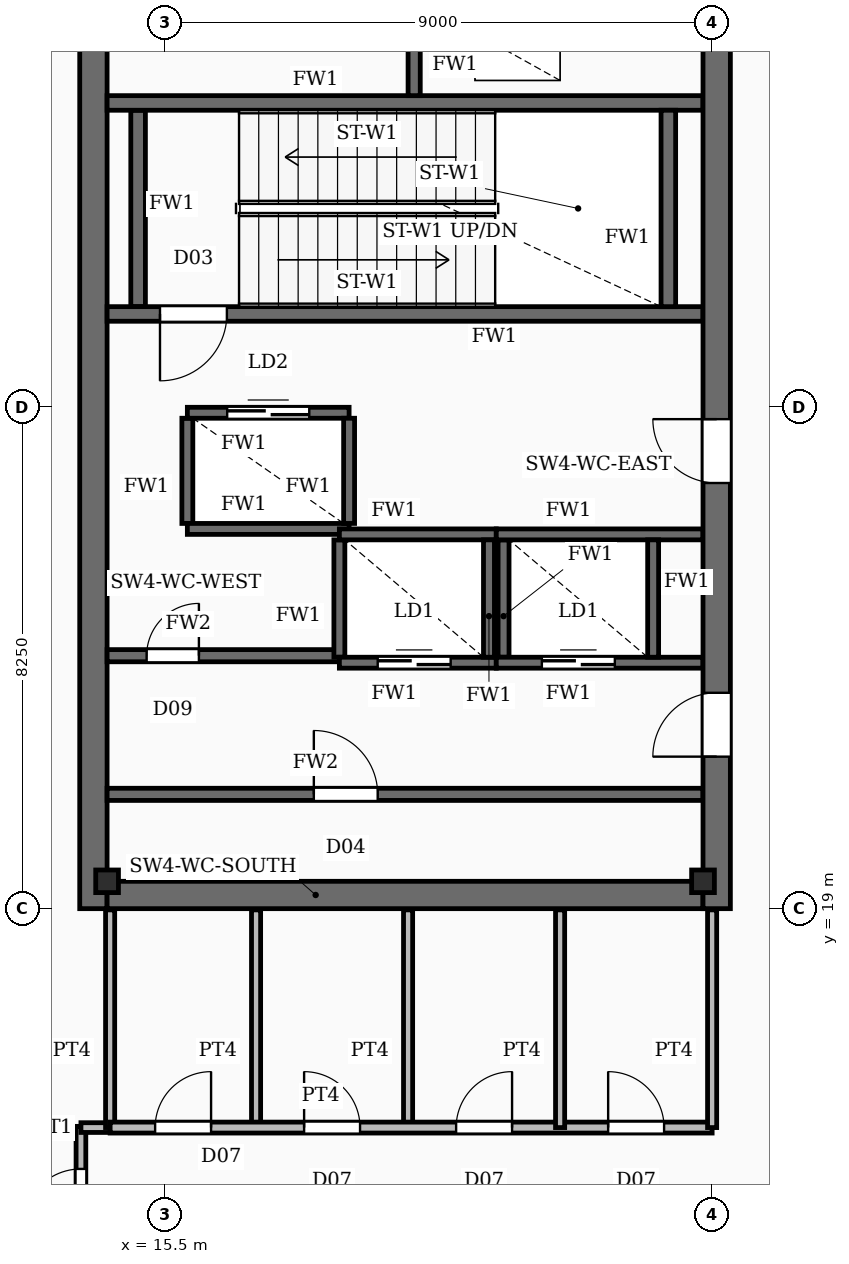
"""IFC4 building model, lengths in metres.
Left out: names, types, materials, properties, quantities, classifications, styles, units other than length and angle.
Written with IfcOpenShell. Run it as: python <this file> out.ifc"""

import sys

from ifc_helpers import new_model, si_unit, direction, frame, frame_2d, origin, origin_2d, place, context, subcontext, project, spatial, rectangle, i_section, extrude, element, fill, save


model = new_model("IFC4")
c1 = context("Model", 3, precision=1e-05, world=origin(), true_north=direction((0.0, 1.0)))
c2 = subcontext(c1, "Body", "Model", "MODEL_VIEW")
j1 = project(units=[si_unit("LENGTHUNIT", "METRE"), si_unit("PLANEANGLEUNIT", "RADIAN")], contexts=[c1])
p1 = place(None, origin())
s1 = spatial("IfcSite", under=j1, at=p1, CompositionType="ELEMENT")
p2 = place(p1, origin())
s2 = spatial("IfcBuilding", under=s1, at=p2, CompositionType="ELEMENT")
p3 = place(p2, frame((0.0, 0.0, 317.2)))
s3 = spatial("IfcBuildingStorey", under=s2, at=p3, CompositionType="ELEMENT", Elevation=317.2)
p4 = place(p3, frame((14.325, 19.0, -0.24), z_axis=(0.0, 0.0, 1.0), x_axis=(0.0, 1.0, 0.0)))
e1 = element("IfcWall", 1, at=p4, inside=s3, PredefinedType="SHEAR", context=c2, shape_type="SweptSolid", body=[
    extrude(rectangle(XDim=15.3, YDim=0.45, at=frame_2d((7.65, 0.0))), origin(), (0.0, 0.0, 1.0), 4.62),
])
p5 = place(p3, frame((24.575, 19.0, -0.24), z_axis=(0.0, 0.0, 1.0), x_axis=(0.0, 1.0, 0.0)))
e2 = element("IfcWall", 2, at=p5, inside=s3, PredefinedType="SHEAR", context=c2, shape_type="SweptSolid", body=[
    extrude(rectangle(XDim=15.3, YDim=0.45, at=frame_2d((7.65, 0.0))), origin(), (0.0, 0.0, 1.0), 4.62),
])
p6 = place(p5, frame((2.5, 0.0, 0.24)))
e3 = element("IfcOpeningElement", 3, at=p6, cuts=e2, PredefinedType="OPENING", context=c2, shape_type="SweptSolid", body=[
    extrude(rectangle(XDim=1.05, YDim=2.15, at=frame_2d((0.525, 1.075))), frame((0.0, 0.235, 0.0), z_axis=(0.0, -1.0, 0.0), x_axis=(1.0, 0.0, 0.0)), (0.0, 0.0, 1.0), 0.47),
])
p7 = place(p5, frame((7.0, 0.0, 0.24)))
e4 = element("IfcOpeningElement", 4, at=p7, cuts=e2, PredefinedType="OPENING", context=c2, shape_type="SweptSolid", body=[
    extrude(rectangle(XDim=1.05, YDim=2.15, at=frame_2d((0.525, 1.075))), frame((0.0, 0.235, 0.0), z_axis=(0.0, -1.0, 0.0), x_axis=(1.0, 0.0, 0.0)), (0.0, 0.0, 1.0), 0.47),
])
p8 = place(p3, frame((14.55, 19.225, -0.24), z_axis=(0.0, 0.0, 1.0), x_axis=(1.0, 0.0, 0.0)))
e5 = element("IfcWall", 5, at=p8, inside=s3, PredefinedType="SHEAR", context=c2, shape_type="SweptSolid", body=[
    extrude(rectangle(XDim=9.8, YDim=0.45, at=frame_2d((4.9, 0.0))), origin(), (0.0, 0.0, 1.0), 4.62),
])
for number, where, z_axis, x_axis in (
    (6, (14.55, 19.45, -0.24), (0.0, 0.0, 1.0), (1.0, 0.0, 0.0)),
    (7, (24.35, 19.45, -0.24), (0.0, 0.0, 1.0), (1.0, 0.0, 0.0)),
):
    element("IfcColumn", number, at=place(p3, frame(where, z_axis=z_axis, x_axis=x_axis)), inside=s3, PredefinedType="COLUMN", context=c2, shape_type="SweptSolid", body=[
        extrude(i_section(OverallWidth=0.374, OverallDepth=0.372, WebThickness=0.016, FlangeThickness=0.026, FilletRadius=0.02, at=origin_2d()), origin(), (0.0, 0.0, 1.0), 4.62),
    ])
p9 = place(p3, frame((24.35, 28.78, 0.0), z_axis=(0.0, 0.0, 1.0), x_axis=(-1.0, 0.0, 0.0)))
e8 = element("IfcWall", 8, at=p9, inside=s3, PredefinedType="SOLIDWALL", context=c2, shape_type="SweptSolid", body=[
    extrude(rectangle(XDim=9.8, YDim=0.24, at=frame_2d((4.9, 0.0))), origin(), (0.0, 0.0, 1.0), 4.38),
])
p10 = place(p9, frame((7.83, 0.0, 0.0)))
e9 = element("IfcOpeningElement", 9, at=p10, cuts=e8, PredefinedType="OPENING", context=c2, shape_type="SweptSolid", body=[
    extrude(rectangle(XDim=1.1, YDim=2.15, at=frame_2d((0.55, 1.075))), frame((0.0, 0.13, 0.0), z_axis=(0.0, -1.0, 0.0), x_axis=(1.0, 0.0, 0.0)), (0.0, 0.0, 1.0), 0.26),
])
p11 = place(p3, frame((14.55, 32.25, 0.0), z_axis=(0.0, 0.0, 1.0), x_axis=(1.0, 0.0, 0.0)))
e10 = element("IfcWall", 10, at=p11, inside=s3, PredefinedType="SOLIDWALL", context=c2, shape_type="SweptSolid", body=[
    extrude(rectangle(XDim=9.8, YDim=0.24, at=frame_2d((4.9, 0.0))), origin(), (0.0, 0.0, 1.0), 4.38),
])
for number, where, z_axis, x_axis in (
    (11, (15.06, 28.9, 0.0), (0.0, 0.0, 1.0), (0.0, 1.0, 0.0)),
    (12, (23.78, 28.9, 0.0), (0.0, 0.0, 1.0), (0.0, 1.0, 0.0)),
):
    element("IfcWall", number, at=place(p3, frame(where, z_axis=z_axis, x_axis=x_axis)), inside=s3, PredefinedType="SOLIDWALL", context=c2, shape_type="SweptSolid", body=[
        extrude(rectangle(XDim=3.23, YDim=0.24, at=frame_2d((1.615, 0.0))), origin(), (0.0, 0.0, 1.0), 4.38),
    ])
p12 = place(p3, frame((19.6, 32.37, 0.0), z_axis=(0.0, 0.0, 1.0), x_axis=(0.0, 1.0, 0.0)))
e13 = element("IfcWall", 13, at=p12, inside=s3, PredefinedType="SOLIDWALL", context=c2, shape_type="SweptSolid", body=[
    extrude(rectangle(XDim=1.43, YDim=0.2, at=frame_2d((0.715, 0.0))), origin(), (0.0, 0.0, 1.0), 4.38),
])
p13 = place(p3, frame((18.37, 25.155, 0.0), z_axis=(0.0, 0.0, 1.0), x_axis=(1.0, 0.0, 0.0)))
e14 = element("IfcWall", 14, at=p13, inside=s3, PredefinedType="SOLIDWALL", context=c2, shape_type="SweptSolid", body=[
    extrude(rectangle(XDim=2.58, YDim=0.18, at=frame_2d((1.29, 0.0))), origin(), (0.0, 0.0, 1.0), 4.38),
])
p14 = place(p3, frame((18.37, 23.045, 0.0), z_axis=(0.0, 0.0, 1.0), x_axis=(1.0, 0.0, 0.0)))
e15 = element("IfcWall", 15, at=p14, inside=s3, PredefinedType="SOLIDWALL", context=c2, shape_type="SweptSolid", body=[
    extrude(rectangle(XDim=2.58, YDim=0.18, at=frame_2d((1.29, 0.0))), origin(), (0.0, 0.0, 1.0), 4.38),
])
p15 = place(p14, frame((0.63, 0.0, 0.0)))
e16 = element("IfcOpeningElement", 16, at=p15, cuts=e15, PredefinedType="OPENING", context=c2, shape_type="SweptSolid", body=[
    extrude(rectangle(XDim=1.2, YDim=2.2, at=frame_2d((0.6, 1.1))), frame((0.0, 0.1, 0.0), z_axis=(0.0, -1.0, 0.0), x_axis=(1.0, 0.0, 0.0)), (0.0, 0.0, 1.0), 0.2),
])
for number, where, z_axis, x_axis in (
    (17, (18.37, 23.135, 0.0), (0.0, 0.0, 1.0), (0.0, 1.0, 0.0)),
    (18, (20.83, 23.135, 0.0), (0.0, 0.0, 1.0), (0.0, 1.0, 0.0)),
):
    element("IfcWall", number, at=place(p3, frame(where, z_axis=z_axis, x_axis=x_axis)), inside=s3, PredefinedType="SOLIDWALL", context=c2, shape_type="SweptSolid", body=[
        extrude(rectangle(XDim=1.93, YDim=0.18, at=frame_2d((0.965, 0.0))), origin(), (0.0, 0.0, 1.0), 4.38),
    ])
p16 = place(p3, frame((20.95, 25.155, 0.0), z_axis=(0.0, 0.0, 1.0), x_axis=(1.0, 0.0, 0.0)))
e19 = element("IfcWall", 19, at=p16, inside=s3, PredefinedType="SOLIDWALL", context=c2, shape_type="SweptSolid", body=[
    extrude(rectangle(XDim=3.4, YDim=0.18, at=frame_2d((1.7, 0.0))), origin(), (0.0, 0.0, 1.0), 4.38),
])
p17 = place(p3, frame((20.95, 23.045, 0.0), z_axis=(0.0, 0.0, 1.0), x_axis=(1.0, 0.0, 0.0)))
e20 = element("IfcWall", 20, at=p17, inside=s3, PredefinedType="SOLIDWALL", context=c2, shape_type="SweptSolid", body=[
    extrude(rectangle(XDim=3.4, YDim=0.18, at=frame_2d((1.7, 0.0))), origin(), (0.0, 0.0, 1.0), 4.38),
])
p18 = place(p17, frame((0.75, 0.0, 0.0)))
e21 = element("IfcOpeningElement", 21, at=p18, cuts=e20, PredefinedType="OPENING", context=c2, shape_type="SweptSolid", body=[
    extrude(rectangle(XDim=1.2, YDim=2.2, at=frame_2d((0.6, 1.1))), frame((0.0, 0.1, 0.0), z_axis=(0.0, -1.0, 0.0), x_axis=(1.0, 0.0, 0.0)), (0.0, 0.0, 1.0), 0.2),
])
for number, where, z_axis, x_axis in (
    (22, (21.07, 23.135, 0.0), (0.0, 0.0, 1.0), (0.0, 1.0, 0.0)),
    (23, (23.53, 23.135, 0.0), (0.0, 0.0, 1.0), (0.0, 1.0, 0.0)),
):
    element("IfcWall", number, at=place(p3, frame(where, z_axis=z_axis, x_axis=x_axis)), inside=s3, PredefinedType="SOLIDWALL", context=c2, shape_type="SweptSolid", body=[
        extrude(rectangle(XDim=1.93, YDim=0.18, at=frame_2d((0.965, 0.0))), origin(), (0.0, 0.0, 1.0), 4.38),
    ])
p19 = place(p3, frame((15.87, 27.155, 0.0), z_axis=(0.0, 0.0, 1.0), x_axis=(1.0, 0.0, 0.0)))
e24 = element("IfcWall", 24, at=p19, inside=s3, PredefinedType="SOLIDWALL", context=c2, shape_type="SweptSolid", body=[
    extrude(rectangle(XDim=2.66, YDim=0.18, at=frame_2d((1.33, 0.0))), origin(), (0.0, 0.0, 1.0), 4.38),
])
p20 = place(p19, frame((0.655, 0.0, 0.0)))
e25 = element("IfcOpeningElement", 25, at=p20, cuts=e24, PredefinedType="OPENING", context=c2, shape_type="SweptSolid", body=[
    extrude(rectangle(XDim=1.35, YDim=2.3, at=frame_2d((0.675, 1.15))), frame((0.0, 0.1, 0.0), z_axis=(0.0, -1.0, 0.0), x_axis=(1.0, 0.0, 0.0)), (0.0, 0.0, 1.0), 0.2),
])
p21 = place(p3, frame((15.87, 25.245, 0.0), z_axis=(0.0, 0.0, 1.0), x_axis=(1.0, 0.0, 0.0)))
e26 = element("IfcWall", 26, at=p21, inside=s3, PredefinedType="SOLIDWALL", context=c2, shape_type="SweptSolid", body=[
    extrude(rectangle(XDim=2.66, YDim=0.18, at=frame_2d((1.33, 0.0))), origin(), (0.0, 0.0, 1.0), 4.38),
])
for number, where, z_axis, x_axis in (
    (27, (15.87, 25.335, 0.0), (0.0, 0.0, 1.0), (0.0, 1.0, 0.0)),
    (28, (18.53, 25.335, 0.0), (0.0, 0.0, 1.0), (0.0, 1.0, 0.0)),
):
    element("IfcWall", number, at=place(p3, frame(where, z_axis=z_axis, x_axis=x_axis)), inside=s3, PredefinedType="SOLIDWALL", context=c2, shape_type="SweptSolid", body=[
        extrude(rectangle(XDim=1.73, YDim=0.18, at=frame_2d((0.865, 0.0))), origin(), (0.0, 0.0, 1.0), 4.38),
    ])
p22 = place(p3, frame((14.55, 20.88, 0.0), z_axis=(0.0, 0.0, 1.0), x_axis=(1.0, 0.0, 0.0)))
e29 = element("IfcWall", 29, at=p22, inside=s3, PredefinedType="SOLIDWALL", context=c2, shape_type="SweptSolid", body=[
    extrude(rectangle(XDim=9.8, YDim=0.2, at=frame_2d((4.9, 0.0))), origin(), (0.0, 0.0, 1.0), 3.44),
])
p23 = place(p22, frame((3.4, 0.0, 0.0)))
e30 = element("IfcOpeningElement", 30, at=p23, cuts=e29, PredefinedType="OPENING", context=c2, shape_type="SweptSolid", body=[
    extrude(rectangle(XDim=1.05, YDim=2.15, at=frame_2d((0.525, 1.075))), frame((0.0, 0.11, 0.0), z_axis=(0.0, -1.0, 0.0), x_axis=(1.0, 0.0, 0.0)), (0.0, 0.0, 1.0), 0.22),
])
p24 = place(p3, frame((14.55, 23.16, 0.0), z_axis=(0.0, 0.0, 1.0), x_axis=(1.0, 0.0, 0.0)))
e31 = element("IfcWall", 31, at=p24, inside=s3, PredefinedType="SOLIDWALL", context=c2, shape_type="SweptSolid", body=[
    extrude(rectangle(XDim=3.82, YDim=0.2, at=frame_2d((1.91, 0.0))), origin(), (0.0, 0.0, 1.0), 3.44),
])
p25 = place(p24, frame((0.65, 0.0, 0.0)))
e32 = element("IfcOpeningElement", 32, at=p25, cuts=e31, PredefinedType="OPENING", context=c2, shape_type="SweptSolid", body=[
    extrude(rectangle(XDim=0.86, YDim=2.05, at=frame_2d((0.43, 1.025))), frame((0.0, 0.11, 0.0), z_axis=(0.0, -1.0, 0.0), x_axis=(1.0, 0.0, 0.0)), (0.0, 0.0, 1.0), 0.22),
])
for number, where, z_axis, x_axis in (
    (33, (17.0, 15.4, 0.0), (0.0, 0.0, 1.0), (0.0, 1.0, 0.0)),
    (34, (19.5, 15.4, 0.0), (0.0, 0.0, 1.0), (0.0, 1.0, 0.0)),
    (35, (22.0, 15.4, 0.0), (0.0, 0.0, 1.0), (0.0, 1.0, 0.0)),
):
    element("IfcWall", number, at=place(p3, frame(where, z_axis=z_axis, x_axis=x_axis)), inside=s3, PredefinedType="PARTITIONING", context=c2, shape_type="SweptSolid", body=[
        extrude(rectangle(XDim=3.58, YDim=0.15, at=frame_2d((1.79, 0.0))), origin(), (0.0, 0.0, 1.0), 3.44),
    ])
p26 = place(p3, frame((14.6, 15.4, 0.0), z_axis=(0.0, 0.0, 1.0), x_axis=(1.0, 0.0, 0.0)))
e36 = element("IfcWall", 36, at=p26, inside=s3, PredefinedType="PARTITIONING", context=c2, shape_type="SweptSolid", body=[
    extrude(rectangle(XDim=9.9, YDim=0.18, at=frame_2d((4.95, 0.0))), origin(), (0.0, 0.0, 1.0), 3.44),
])
p27 = place(p26, frame((0.74, 0.0, 0.0)))
e37 = element("IfcOpeningElement", 37, at=p27, cuts=e36, PredefinedType="OPENING", context=c2, shape_type="SweptSolid", body=[
    extrude(rectangle(XDim=0.92, YDim=2.1, at=frame_2d((0.46, 1.05))), frame((0.0, 0.1, 0.0), z_axis=(0.0, -1.0, 0.0), x_axis=(1.0, 0.0, 0.0)), (0.0, 0.0, 1.0), 0.2),
])
p28 = place(p26, frame((3.19, 0.0, 0.0)))
e38 = element("IfcOpeningElement", 38, at=p28, cuts=e36, PredefinedType="OPENING", context=c2, shape_type="SweptSolid", body=[
    extrude(rectangle(XDim=0.92, YDim=2.1, at=frame_2d((0.46, 1.05))), frame((0.0, 0.1, 0.0), z_axis=(0.0, -1.0, 0.0), x_axis=(1.0, 0.0, 0.0)), (0.0, 0.0, 1.0), 0.2),
])
p29 = place(p26, frame((5.69, 0.0, 0.0)))
e39 = element("IfcOpeningElement", 39, at=p29, cuts=e36, PredefinedType="OPENING", context=c2, shape_type="SweptSolid", body=[
    extrude(rectangle(XDim=0.92, YDim=2.1, at=frame_2d((0.46, 1.05))), frame((0.0, 0.1, 0.0), z_axis=(0.0, -1.0, 0.0), x_axis=(1.0, 0.0, 0.0)), (0.0, 0.0, 1.0), 0.2),
])
p30 = place(p26, frame((8.19, 0.0, 0.0)))
e40 = element("IfcOpeningElement", 40, at=p30, cuts=e36, PredefinedType="OPENING", context=c2, shape_type="SweptSolid", body=[
    extrude(rectangle(XDim=0.92, YDim=2.1, at=frame_2d((0.46, 1.05))), frame((0.0, 0.1, 0.0), z_axis=(0.0, -1.0, 0.0), x_axis=(1.0, 0.0, 0.0)), (0.0, 0.0, 1.0), 0.2),
])
for number, where, z_axis, x_axis in (
    (41, (14.6, 15.4, 0.0), (0.0, 0.0, 1.0), (0.0, 1.0, 0.0)),
    (42, (24.5, 15.4, 0.0), (0.0, 0.0, 1.0), (0.0, 1.0, 0.0)),
):
    element("IfcWall", number, at=place(p3, frame(where, z_axis=z_axis, x_axis=x_axis)), inside=s3, PredefinedType="PARTITIONING", context=c2, shape_type="SweptSolid", body=[
        extrude(rectangle(XDim=3.58, YDim=0.15, at=frame_2d((1.79, 0.0))), origin(), (0.0, 0.0, 1.0), 3.44),
    ])
p31 = place(p3, frame((14.12, 15.4, 0.0), z_axis=(0.0, 0.0, 1.0), x_axis=(1.0, 0.0, 0.0)))
e43 = element("IfcWall", 43, at=p31, inside=s3, PredefinedType="PARTITIONING", context=c2, shape_type="SweptSolid", body=[
    extrude(rectangle(XDim=0.5, YDim=0.16, at=frame_2d((0.25, 0.0))), origin(), (0.0, 0.0, 1.0), 3.44),
])
p32 = place(p3, frame((14.12, 13.12, 0.0), z_axis=(0.0, 0.0, 1.0), x_axis=(0.0, 1.0, 0.0)))
e44 = element("IfcWall", 44, at=p32, inside=s3, PredefinedType="PARTITIONING", context=c2, shape_type="SweptSolid", body=[
    extrude(rectangle(XDim=2.3, YDim=0.16, at=frame_2d((1.15, 0.0))), origin(), (0.0, 0.0, 1.0), 3.44),
])
p33 = place(p32, frame((0.65, 0.0, 0.0)))
e45 = element("IfcOpeningElement", 45, at=p33, cuts=e44, PredefinedType="OPENING", context=c2, shape_type="SweptSolid", body=[
    extrude(rectangle(XDim=0.95, YDim=2.15, at=frame_2d((0.475, 1.075))), frame((0.0, 0.09, 0.0), z_axis=(0.0, -1.0, 0.0), x_axis=(1.0, 0.0, 0.0)), (0.0, 0.0, 1.0), 0.18),
])
p34 = place(p6, origin())
e46 = element("IfcDoor", 46, at=p34, inside=s3, OperationType="SINGLE_SWING_LEFT", PredefinedType="DOOR", context=c2, shape_type="SweptSolid", body=[
    extrude(rectangle(XDim=1.05, YDim=2.15, at=frame_2d((0.525, 1.075))), frame((0.0, 0.025, 0.0), z_axis=(0.0, -1.0, 0.0), x_axis=(1.0, 0.0, 0.0)), (0.0, 0.0, 1.0), 0.05),
])
fill(e3, e46)
p35 = place(p7, origin())
e47 = element("IfcDoor", 47, at=p35, inside=s3, OperationType="SINGLE_SWING_RIGHT", PredefinedType="DOOR", context=c2, shape_type="SweptSolid", body=[
    extrude(rectangle(XDim=1.05, YDim=2.15, at=frame_2d((0.525, 1.075))), frame((0.0, 0.025, 0.0), z_axis=(0.0, -1.0, 0.0), x_axis=(1.0, 0.0, 0.0)), (0.0, 0.0, 1.0), 0.05),
])
fill(e4, e47)
p36 = place(p10, origin())
e48 = element("IfcDoor", 48, at=p36, inside=s3, OperationType="SINGLE_SWING_RIGHT", PredefinedType="DOOR", context=c2, shape_type="SweptSolid", body=[
    extrude(rectangle(XDim=1.1, YDim=2.15, at=frame_2d((0.55, 1.075))), frame((0.0, 0.025, 0.0), z_axis=(0.0, -1.0, 0.0), x_axis=(1.0, 0.0, 0.0)), (0.0, 0.0, 1.0), 0.05),
])
fill(e9, e48)
p37 = place(p15, origin())
e49 = element("IfcDoor", 49, at=p37, inside=s3, OperationType="DOUBLE_DOOR_SLIDING", PredefinedType="DOOR", context=c2, shape_type="SweptSolid", body=[
    extrude(rectangle(XDim=1.2, YDim=2.2, at=frame_2d((0.6, 1.1))), frame((0.0, 0.025, 0.0), z_axis=(0.0, -1.0, 0.0), x_axis=(1.0, 0.0, 0.0)), (0.0, 0.0, 1.0), 0.05),
])
fill(e16, e49)
p38 = place(p18, origin())
e50 = element("IfcDoor", 50, at=p38, inside=s3, OperationType="DOUBLE_DOOR_SLIDING", PredefinedType="DOOR", context=c2, shape_type="SweptSolid", body=[
    extrude(rectangle(XDim=1.2, YDim=2.2, at=frame_2d((0.6, 1.1))), frame((0.0, 0.025, 0.0), z_axis=(0.0, -1.0, 0.0), x_axis=(1.0, 0.0, 0.0)), (0.0, 0.0, 1.0), 0.05),
])
fill(e21, e50)
p39 = place(p20, origin())
e51 = element("IfcDoor", 51, at=p39, inside=s3, OperationType="DOUBLE_DOOR_SLIDING", PredefinedType="DOOR", context=c2, shape_type="SweptSolid", body=[
    extrude(rectangle(XDim=1.35, YDim=2.3, at=frame_2d((0.675, 1.15))), frame((0.0, 0.025, 0.0), z_axis=(0.0, -1.0, 0.0), x_axis=(1.0, 0.0, 0.0)), (0.0, 0.0, 1.0), 0.05),
])
fill(e25, e51)
p40 = place(p23, origin())
e52 = element("IfcDoor", 52, at=p40, inside=s3, OperationType="SINGLE_SWING_LEFT", PredefinedType="DOOR", context=c2, shape_type="SweptSolid", body=[
    extrude(rectangle(XDim=1.05, YDim=2.15, at=frame_2d((0.525, 1.075))), frame((0.0, 0.025, 0.0), z_axis=(0.0, -1.0, 0.0), x_axis=(1.0, 0.0, 0.0)), (0.0, 0.0, 1.0), 0.05),
])
fill(e30, e52)
p41 = place(p25, origin())
e53 = element("IfcDoor", 53, at=p41, inside=s3, OperationType="SINGLE_SWING_RIGHT", PredefinedType="DOOR", context=c2, shape_type="SweptSolid", body=[
    extrude(rectangle(XDim=0.86, YDim=2.05, at=frame_2d((0.43, 1.025))), frame((0.0, 0.025, 0.0), z_axis=(0.0, -1.0, 0.0), x_axis=(1.0, 0.0, 0.0)), (0.0, 0.0, 1.0), 0.05),
])
fill(e32, e53)
p42 = place(p27, origin())
e54 = element("IfcDoor", 54, at=p42, inside=s3, OperationType="SINGLE_SWING_RIGHT", PredefinedType="DOOR", context=c2, shape_type="SweptSolid", body=[
    extrude(rectangle(XDim=0.92, YDim=2.1, at=frame_2d((0.46, 1.05))), frame((0.0, 0.025, 0.0), z_axis=(0.0, -1.0, 0.0), x_axis=(1.0, 0.0, 0.0)), (0.0, 0.0, 1.0), 0.05),
])
fill(e37, e54)
p43 = place(p28, origin())
e55 = element("IfcDoor", 55, at=p43, inside=s3, OperationType="SINGLE_SWING_LEFT", PredefinedType="DOOR", context=c2, shape_type="SweptSolid", body=[
    extrude(rectangle(XDim=0.92, YDim=2.1, at=frame_2d((0.46, 1.05))), frame((0.0, 0.025, 0.0), z_axis=(0.0, -1.0, 0.0), x_axis=(1.0, 0.0, 0.0)), (0.0, 0.0, 1.0), 0.05),
])
fill(e38, e55)
p44 = place(p29, origin())
e56 = element("IfcDoor", 56, at=p44, inside=s3, OperationType="SINGLE_SWING_RIGHT", PredefinedType="DOOR", context=c2, shape_type="SweptSolid", body=[
    extrude(rectangle(XDim=0.92, YDim=2.1, at=frame_2d((0.46, 1.05))), frame((0.0, 0.025, 0.0), z_axis=(0.0, -1.0, 0.0), x_axis=(1.0, 0.0, 0.0)), (0.0, 0.0, 1.0), 0.05),
])
fill(e39, e56)
p45 = place(p30, origin())
e57 = element("IfcDoor", 57, at=p45, inside=s3, OperationType="SINGLE_SWING_LEFT", PredefinedType="DOOR", context=c2, shape_type="SweptSolid", body=[
    extrude(rectangle(XDim=0.92, YDim=2.1, at=frame_2d((0.46, 1.05))), frame((0.0, 0.025, 0.0), z_axis=(0.0, -1.0, 0.0), x_axis=(1.0, 0.0, 0.0)), (0.0, 0.0, 1.0), 0.05),
])
fill(e40, e57)
p46 = place(p33, origin())
e58 = element("IfcDoor", 58, at=p46, inside=s3, OperationType="SINGLE_SWING_LEFT", PredefinedType="DOOR", context=c2, shape_type="SweptSolid", body=[
    extrude(rectangle(XDim=0.95, YDim=2.15, at=frame_2d((0.475, 1.075))), frame((0.0, 0.025, 0.0), z_axis=(0.0, -1.0, 0.0), x_axis=(1.0, 0.0, 0.0)), (0.0, 0.0, 1.0), 0.05),
])
fill(e45, e58)
save(model, sys.argv[1])
